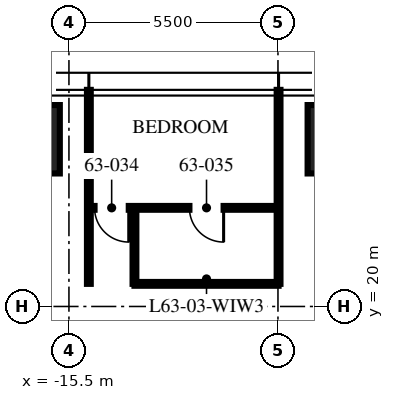
"""IFC4 building model, lengths in metres.
Left out: names, types, materials, properties, quantities, classifications, styles, units other than length and angle.
Written with IfcOpenShell. Run it as: python <this file> out.ifc"""

import sys

from ifc_helpers import new_model, si_unit, direction, frame, frame_2d, origin, origin_2d, place, context, subcontext, project, spatial, rectangle, extrude, element, fill, save


model = new_model("IFC4")
c1 = context("Model", 3, precision=1e-05, world=origin(), true_north=direction((0.0, 1.0)))
c2 = subcontext(c1, "Body", "Model", "MODEL_VIEW")
j1 = project(units=[si_unit("LENGTHUNIT", "METRE"), si_unit("PLANEANGLEUNIT", "RADIAN")], contexts=[c1])
p1 = place(None, origin())
s1 = spatial("IfcSite", under=j1, at=p1, CompositionType="ELEMENT")
p2 = place(p1, origin())
s2 = spatial("IfcBuilding", under=s1, at=p2, CompositionType="ELEMENT")
p3 = place(p2, frame((0.0, 0.0, 252.0)))
s3 = spatial("IfcBuildingStorey", under=s2, at=p3, CompositionType="ELEMENT", Elevation=252.0)
for number, where, z_axis, x_axis in (
    (1, (-16.64, 24.4, 0.0), (0.0, 0.0, 1.0), (1.0, 0.0, 0.0)),
    (2, (-8.32, 24.4, 0.0), (0.0, 0.0, 1.0), (1.0, 0.0, 0.0)),
):
    element("IfcColumn", number, at=place(p3, frame(where, z_axis=z_axis, x_axis=x_axis)), inside=s3, PredefinedType="COLUMN", context=c2, shape_type="SweptSolid", body=[
        extrude(rectangle(XDim=1.8, YDim=1.8, at=origin_2d()), origin(), (0.0, 0.0, 1.0), 3.75),
    ])
for number, where, z_axis, x_axis in (
    (3, (-9.984, 20.595, 0.0), (0.0, 0.0, 1.0), (0.0, 1.0, 0.0)),
    (4, (-14.976, 20.595, 0.0), (0.0, 0.0, 1.0), (0.0, 1.0, 0.0)),
):
    element("IfcWall", number, at=place(p3, frame(where, z_axis=z_axis, x_axis=x_axis)), inside=s3, PredefinedType="PARTITIONING", context=c2, shape_type="SweptSolid", body=[
        extrude(rectangle(XDim=5.105, YDim=0.1, at=frame_2d((2.552, 0.0))), origin(), (0.0, 0.0, 1.0), 2.91),
    ])
p4 = place(p3, frame((-9.984, 22.595, 0.0), z_axis=(0.0, 0.0, 1.0), x_axis=(-1.0, 0.0, 0.0)))
e5 = element("IfcWall", 5, at=p4, inside=s3, PredefinedType="PARTITIONING", context=c2, shape_type="SweptSolid", body=[
    extrude(rectangle(XDim=4.992, YDim=0.1, at=frame_2d((2.496, 0.0))), origin(), (0.0, 0.0, 1.0), 2.81),
])
p5 = place(p4, frame((3.942, 0.0, 0.0)))
e6 = element("IfcOpeningElement", 6, at=p5, cuts=e5, PredefinedType="OPENING", context=c2, shape_type="SweptSolid", body=[
    extrude(rectangle(XDim=0.9, YDim=2.1, at=frame_2d((0.45, 1.05))), frame((0.0, 0.06, 0.0), z_axis=(0.0, -1.0, 0.0), x_axis=(1.0, 0.0, 0.0)), (0.0, 0.0, 1.0), 0.12),
])
p6 = place(p4, frame((1.446, 0.0, 0.0)))
e7 = element("IfcOpeningElement", 7, at=p6, cuts=e5, PredefinedType="OPENING", context=c2, shape_type="SweptSolid", body=[
    extrude(rectangle(XDim=0.9, YDim=2.1, at=frame_2d((0.45, 1.05))), frame((0.0, 0.06, 0.0), z_axis=(0.0, -1.0, 0.0), x_axis=(1.0, 0.0, 0.0)), (0.0, 0.0, 1.0), 0.12),
])
p7 = place(p3, frame((-13.776, 20.595, 0.0), z_axis=(0.0, 0.0, 1.0), x_axis=(0.0, 1.0, 0.0)))
e8 = element("IfcWall", 8, at=p7, inside=s3, PredefinedType="PARTITIONING", context=c2, shape_type="SweptSolid", body=[
    extrude(rectangle(XDim=2.0, YDim=0.1, at=frame_2d((1.0, 0.0))), origin(), (0.0, 0.0, 1.0), 3.5),
])
p8 = place(p3, frame((-9.984, 20.595, 0.0), z_axis=(0.0, 0.0, 1.0), x_axis=(-1.0, 0.0, 0.0)))
e9 = element("IfcWall", 9, at=p8, inside=s3, PredefinedType="PARTITIONING", context=c2, shape_type="SweptSolid", body=[
    extrude(rectangle(XDim=3.792, YDim=0.1, at=frame_2d((1.896, 0.0))), origin(), (0.0, 0.0, 1.0), 2.81),
])
p9 = place(p5, origin())
e10 = element("IfcDoor", 10, at=p9, inside=s3, OperationType="SINGLE_SWING_LEFT", PredefinedType="DOOR", context=c2, shape_type="SweptSolid", body=[
    extrude(rectangle(XDim=0.9, YDim=2.1, at=frame_2d((0.45, 1.05))), frame((0.0, 0.025, 0.0), z_axis=(0.0, -1.0, 0.0), x_axis=(1.0, 0.0, 0.0)), (0.0, 0.0, 1.0), 0.05),
])
fill(e6, e10)
p10 = place(p6, origin())
e11 = element("IfcDoor", 11, at=p10, inside=s3, OperationType="SINGLE_SWING_LEFT", PredefinedType="DOOR", context=c2, shape_type="SweptSolid", body=[
    extrude(rectangle(XDim=0.9, YDim=2.1, at=frame_2d((0.45, 1.05))), frame((0.0, 0.025, 0.0), z_axis=(0.0, -1.0, 0.0), x_axis=(1.0, 0.0, 0.0)), (0.0, 0.0, 1.0), 0.05),
])
fill(e7, e11)
save(model, sys.argv[1])
